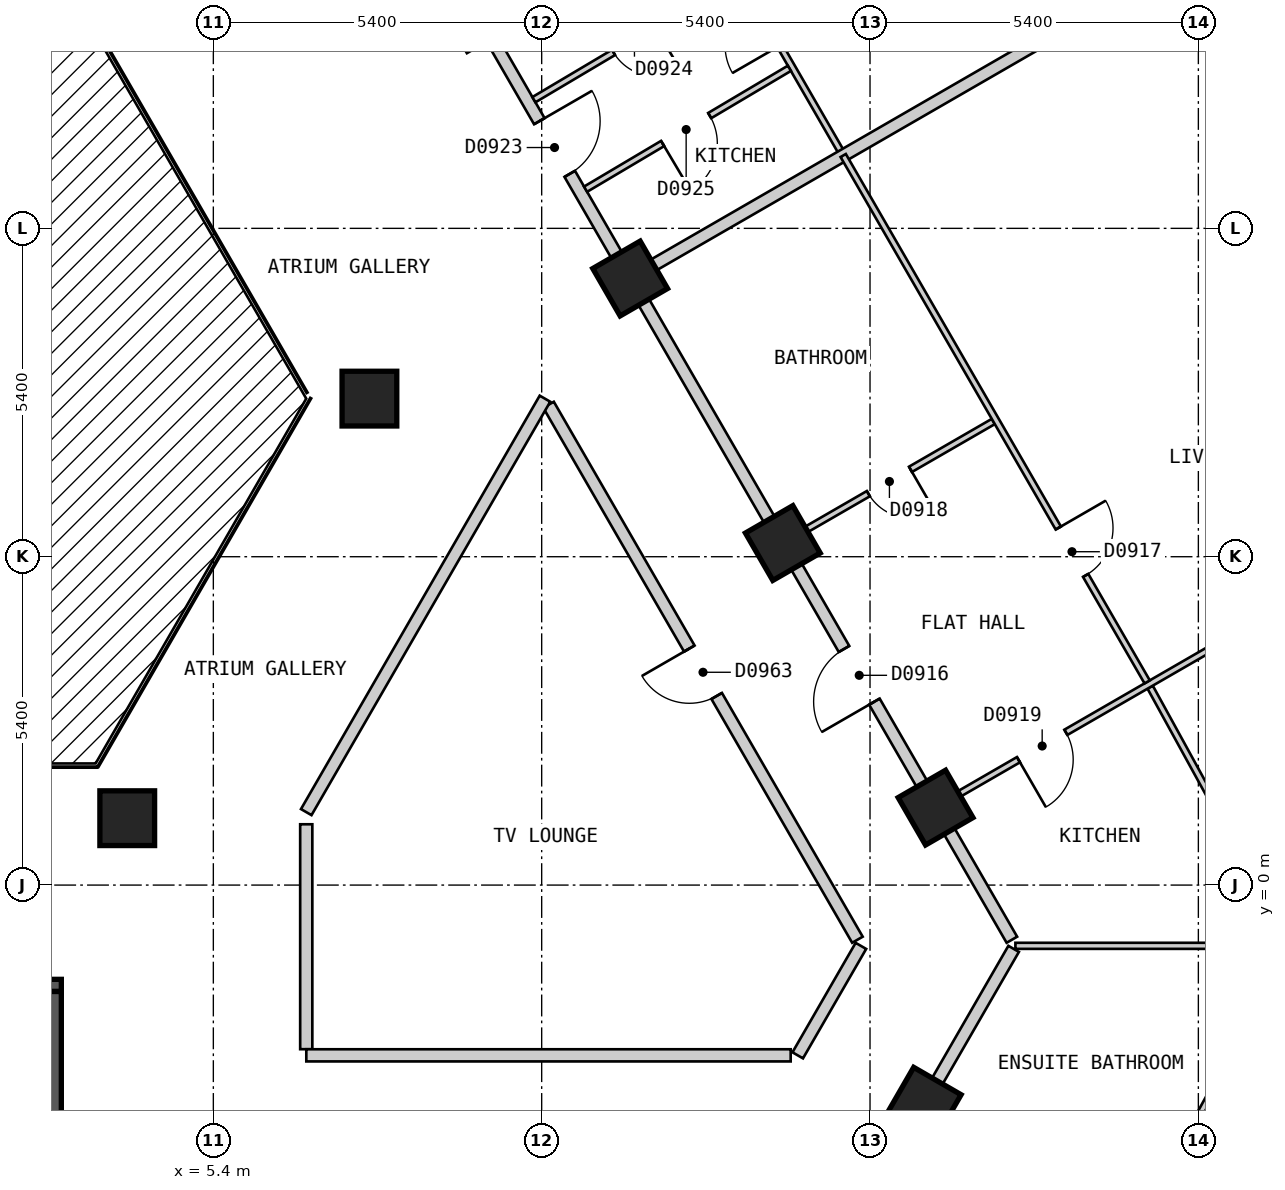
"""IFC4 building model, lengths in metres.
Left out: names, types, materials, properties, quantities, classifications, styles, units other than length and angle.
Written with IfcOpenShell. Run it as: python <this file> out.ifc"""

import sys

from ifc_helpers import new_model, si_unit, direction, frame, frame_2d, origin, origin_2d, place, context, subcontext, project, spatial, polyline, rectangle, outline, extrude, element, fill, save


model = new_model("IFC4")
c1 = context("Model", 3, precision=1e-05, world=origin(), true_north=direction((0.0, 1.0)))
c2 = subcontext(c1, "Body", "Model", "MODEL_VIEW")
j1 = project(units=[si_unit("LENGTHUNIT", "METRE"), si_unit("PLANEANGLEUNIT", "RADIAN")], contexts=[c1])
p1 = place(None, origin())
s1 = spatial("IfcSite", under=j1, at=p1, CompositionType="ELEMENT")
p2 = place(p1, origin())
s2 = spatial("IfcBuilding", under=s1, at=p2, CompositionType="ELEMENT")
p3 = place(p2, frame((0.0, 0.0, 102.0)))
s3 = spatial("IfcBuildingStorey", under=s2, at=p3, CompositionType="ELEMENT", Elevation=102.0)
for number, where, z_axis, x_axis in (
    (1, (17.083, -3.612, 0.0), (0.0, 0.0, 1.0), (0.5, 0.866, 0.0)),
    (2, (17.278, 1.274, 0.0), (0.0, 0.0, 1.0), (-0.5, 0.866, 0.0)),
    (3, (3.984, 1.1, 0.0), (0.0, 0.0, 1.0), (1.0, 0.0, 0.0)),
    (4, (14.766, 5.625, 0.0), (0.0, 0.0, 1.0), (-0.5, 0.866, 0.0)),
    (5, (12.255, 9.975, 0.0), (0.0, 0.0, 1.0), (-0.5, 0.866, 0.0)),
    (6, (7.967, 8.0, 0.0), (0.0, 0.0, 1.0), (1.0, 0.0, 0.0)),
):
    element("IfcColumn", number, at=place(p3, frame(where, z_axis=z_axis, x_axis=x_axis)), inside=s3, PredefinedType="COLUMN", context=c2, shape_type="SweptSolid", body=[
        extrude(rectangle(XDim=0.9, YDim=0.9, at=origin_2d()), origin(), (0.0, 0.0, 1.0), 3.0),
    ])
p4 = place(p3, frame((17.479, -23.425, 0.0), z_axis=(0.0, 0.0, 1.0), x_axis=(0.500035407905, 0.866004960056, 0.0)))
e7 = element("IfcWall", 7, at=p4, inside=s3, PredefinedType="SOLIDWALL", context=c2, shape_type="SweptSolid", body=[
    extrude(outline(polyline([(0.0, -0.15), (23.094, -0.15), (23.014, 0.15), (0.08, 0.15), (0.0, -0.15)])), origin(), (0.0, 0.0, 1.0), 2.7),
])
p5 = place(p4, frame((2.677, 0.0, 0.15)))
e8 = element("IfcOpeningElement", 8, at=p5, cuts=e7, PredefinedType="OPENING", context=c2, shape_type="SweptSolid", body=[
    extrude(rectangle(XDim=1.5, YDim=2.1, at=frame_2d((0.75, 1.05))), frame((0.0, 0.16, 0.0), z_axis=(0.0, -1.0, 0.0), x_axis=(1.0, 0.0, 0.0)), (0.0, 0.0, 1.0), 0.32),
])
p6 = place(p4, frame((8.091, 0.0, 0.15)))
e9 = element("IfcOpeningElement", 9, at=p6, cuts=e7, PredefinedType="OPENING", context=c2, shape_type="SweptSolid", body=[
    extrude(rectangle(XDim=1.5, YDim=2.1, at=frame_2d((0.75, 1.05))), frame((0.0, 0.16, 0.0), z_axis=(0.0, -1.0, 0.0), x_axis=(1.0, 0.0, 0.0)), (0.0, 0.0, 1.0), 0.32),
])
p7 = place(p4, frame((13.504, 0.0, 0.15)))
e10 = element("IfcOpeningElement", 10, at=p7, cuts=e7, PredefinedType="OPENING", context=c2, shape_type="SweptSolid", body=[
    extrude(rectangle(XDim=1.5, YDim=2.1, at=frame_2d((0.75, 1.05))), frame((0.0, 0.16, 0.0), z_axis=(0.0, -1.0, 0.0), x_axis=(1.0, 0.0, 0.0)), (0.0, 0.0, 1.0), 0.32),
])
p8 = place(p4, frame((18.917, 0.0, 0.15)))
e11 = element("IfcOpeningElement", 11, at=p8, cuts=e7, PredefinedType="OPENING", context=c2, shape_type="SweptSolid", body=[
    extrude(rectangle(XDim=1.5, YDim=2.1, at=frame_2d((0.75, 1.05))), frame((0.0, 0.16, 0.0), z_axis=(0.0, -1.0, 0.0), x_axis=(1.0, 0.0, 0.0)), (0.0, 0.0, 1.0), 0.32),
])
p9 = place(p3, frame((29.027, 1.425, 0.0), z_axis=(0.0, 0.0, 1.0), x_axis=(-0.500027479704, 0.866009537788, 0.0)))
e12 = element("IfcWall", 12, at=p9, inside=s3, PredefinedType="SOLIDWALL", context=c2, shape_type="SweptSolid", body=[
    extrude(outline(polyline([(0.0, -0.15), (26.559, -0.15), (26.478, 0.15), (0.08, 0.15), (0.0, -0.15)])), origin(), (0.0, 0.0, 1.0), 2.7),
])
p10 = place(p9, frame((2.483, 0.0, 0.15)))
e13 = element("IfcOpeningElement", 13, at=p10, cuts=e12, PredefinedType="OPENING", context=c2, shape_type="SweptSolid", body=[
    extrude(rectangle(XDim=1.5, YDim=2.1, at=frame_2d((0.75, 1.05))), frame((0.0, 0.16, 0.0), z_axis=(0.0, -1.0, 0.0), x_axis=(1.0, 0.0, 0.0)), (0.0, 0.0, 1.0), 0.32),
])
p11 = place(p9, frame((7.506, 0.0, 0.15)))
e14 = element("IfcOpeningElement", 14, at=p11, cuts=e12, PredefinedType="OPENING", context=c2, shape_type="SweptSolid", body=[
    extrude(rectangle(XDim=1.5, YDim=2.1, at=frame_2d((0.75, 1.05))), frame((0.0, 0.16, 0.0), z_axis=(0.0, -1.0, 0.0), x_axis=(1.0, 0.0, 0.0)), (0.0, 0.0, 1.0), 0.32),
])
p12 = place(p9, frame((12.529, 0.0, 0.15)))
e15 = element("IfcOpeningElement", 15, at=p12, cuts=e12, PredefinedType="OPENING", context=c2, shape_type="SweptSolid", body=[
    extrude(rectangle(XDim=1.5, YDim=2.1, at=frame_2d((0.75, 1.05))), frame((0.0, 0.16, 0.0), z_axis=(0.0, -1.0, 0.0), x_axis=(1.0, 0.0, 0.0)), (0.0, 0.0, 1.0), 0.32),
])
p13 = place(p9, frame((17.552, 0.0, 0.15)))
e16 = element("IfcOpeningElement", 16, at=p13, cuts=e12, PredefinedType="OPENING", context=c2, shape_type="SweptSolid", body=[
    extrude(rectangle(XDim=1.5, YDim=2.1, at=frame_2d((0.75, 1.05))), frame((0.0, 0.16, 0.0), z_axis=(0.0, -1.0, 0.0), x_axis=(1.0, 0.0, 0.0)), (0.0, 0.0, 1.0), 0.32),
])
p14 = place(p9, frame((22.575, 0.0, 0.15)))
e17 = element("IfcOpeningElement", 17, at=p14, cuts=e12, PredefinedType="OPENING", context=c2, shape_type="SweptSolid", body=[
    extrude(rectangle(XDim=1.5, YDim=2.1, at=frame_2d((0.75, 1.05))), frame((0.0, 0.16, 0.0), z_axis=(0.0, -1.0, 0.0), x_axis=(1.0, 0.0, 0.0)), (0.0, 0.0, 1.0), 0.32),
])
p15 = place(p3, frame((-2.9, -1.65, 0.0), z_axis=(0.0, 0.0, 1.0), x_axis=(1.0, 0.0, 0.0)))
e18 = element("IfcWall", 18, at=p15, inside=s3, PredefinedType="SOLIDWALL", context=c2, shape_type="SweptSolid", body=[
    extrude(rectangle(XDim=5.8, YDim=0.2, at=frame_2d((2.9, 0.0))), origin(), (0.0, 0.0, 1.0), 2.7),
])
p16 = place(p15, frame((0.3, 0.0, 0.0)))
e19 = element("IfcOpeningElement", 19, at=p16, cuts=e18, PredefinedType="OPENING", context=c2, shape_type="SweptSolid", body=[
    extrude(rectangle(XDim=1.2, YDim=2.1, at=frame_2d((0.6, 1.05))), frame((0.0, 0.11, 0.0), z_axis=(0.0, -1.0, 0.0), x_axis=(1.0, 0.0, 0.0)), (0.0, 0.0, 1.0), 0.22),
])
p17 = place(p3, frame((2.8, -4.5, 0.0), z_axis=(0.0, 0.0, 1.0), x_axis=(0.0, 1.0, 0.0)))
e20 = element("IfcWall", 20, at=p17, inside=s3, PredefinedType="SOLIDWALL", context=c2, shape_type="SweptSolid", body=[
    extrude(rectangle(XDim=2.75, YDim=0.2, at=frame_2d((1.375, 0.0))), origin(), (0.0, 0.0, 1.0), 2.7),
])
p18 = place(p3, frame((10.913, 7.899, 0.0), z_axis=(0.0, 0.0, 1.0), x_axis=(0.500028940566, -0.866008694296, 0.0)))
e21 = element("IfcWall", 21, at=p18, inside=s3, PredefinedType="PARTITIONING", context=c2, shape_type="SweptSolid", body=[
    extrude(rectangle(XDim=10.159, YDim=0.2, at=frame_2d((5.08, 0.0))), origin(), (0.0, 0.0, 1.0), 2.7),
])
p19 = place(p18, frame((4.63, 0.0, 0.0)))
e22 = element("IfcOpeningElement", 22, at=p19, cuts=e21, PredefinedType="OPENING", context=c2, shape_type="SweptSolid", body=[
    extrude(rectangle(XDim=0.9, YDim=2.1, at=frame_2d((0.45, 1.05))), frame((0.0, 0.11, 0.0), z_axis=(0.0, -1.0, 0.0), x_axis=(1.0, 0.0, 0.0)), (0.0, 0.0, 1.0), 0.22),
])
p20 = place(p3, frame((8.488, 16.5, 0.0), z_axis=(0.0, 0.0, 1.0), x_axis=(0.499986836607, -0.86603300354, 0.0)))
e23 = element("IfcWall", 23, at=p20, inside=s3, PredefinedType="PARTITIONING", context=c2, shape_type="SweptSolid", body=[
    extrude(rectangle(XDim=20.09, YDim=0.2, at=frame_2d((10.045, 0.0))), origin(), (0.0, 0.0, 1.0), 2.7),
])
p21 = place(p20, frame((14.569, 0.0, 0.0)))
e24 = element("IfcOpeningElement", 24, at=p21, cuts=e23, PredefinedType="OPENING", context=c2, shape_type="SweptSolid", body=[
    extrude(rectangle(XDim=1.0, YDim=2.1, at=frame_2d((0.5, 1.05))), frame((0.0, 0.11, 0.0), z_axis=(0.0, -1.0, 0.0), x_axis=(1.0, 0.0, 0.0)), (0.0, 0.0, 1.0), 0.22),
])
p22 = place(p20, frame((4.547, 0.0, 0.0)))
e25 = element("IfcOpeningElement", 25, at=p22, cuts=e23, PredefinedType="OPENING", context=c2, shape_type="SweptSolid", body=[
    extrude(rectangle(XDim=1.0, YDim=2.1, at=frame_2d((0.5, 1.05))), frame((0.0, 0.11, 0.0), z_axis=(0.0, -1.0, 0.0), x_axis=(1.0, 0.0, 0.0)), (0.0, 0.0, 1.0), 0.22),
])
p23 = place(p3, frame((6.928, 1.0, 0.0), z_axis=(0.0, 0.0, 1.0), x_axis=(0.0, -1.0, 0.0)))
e26 = element("IfcWall", 26, at=p23, inside=s3, PredefinedType="PARTITIONING", context=c2, shape_type="SweptSolid", body=[
    extrude(rectangle(XDim=3.699, YDim=0.2, at=frame_2d((1.85, 0.0))), origin(), (0.0, 0.0, 1.0), 2.7),
])
p24 = place(p3, frame((6.929, -2.8, 0.0), z_axis=(0.0, 0.0, 1.0), x_axis=(1.0, 0.0, 0.0)))
e27 = element("IfcWall", 27, at=p24, inside=s3, PredefinedType="PARTITIONING", context=c2, shape_type="SweptSolid", body=[
    extrude(rectangle(XDim=7.966, YDim=0.2, at=frame_2d((3.983, 0.0))), origin(), (0.0, 0.0, 1.0), 2.7),
])
p25 = place(p3, frame((6.928, 1.2, 0.0), z_axis=(0.0, 0.0, 1.0), x_axis=(0.500055327065, 0.865993458332, 0.0)))
e28 = element("IfcWall", 28, at=p25, inside=s3, PredefinedType="PARTITIONING", context=c2, shape_type="SweptSolid", body=[
    extrude(rectangle(XDim=7.851, YDim=0.2, at=frame_2d((3.926, 0.0))), origin(), (0.0, 0.0, 1.0), 2.7),
])
p26 = place(p3, frame((15.011, -2.8, 0.0), z_axis=(0.0, 0.0, 1.0), x_axis=(0.499929208183, 0.866066271601, 0.0)))
e29 = element("IfcWall", 29, at=p26, inside=s3, PredefinedType="PARTITIONING", context=c2, shape_type="SweptSolid", body=[
    extrude(rectangle(XDim=2.078, YDim=0.2, at=frame_2d((1.039, 0.0))), origin(), (0.0, 0.0, 1.0), 2.7),
])
p27 = place(p3, frame((15.771, -5.884, 0.0), z_axis=(0.0, 0.0, 1.0), x_axis=(0.499939494019, 0.866060334111, 0.0)))
e30 = element("IfcWall", 30, at=p27, inside=s3, PredefinedType="PARTITIONING", context=c2, shape_type="SweptSolid", body=[
    extrude(rectangle(XDim=5.583, YDim=0.2, at=frame_2d((2.792, 0.0))), origin(), (0.0, 0.0, 1.0), 2.7),
])
p28 = place(p3, frame((13.263, 16.322, 0.0), z_axis=(0.0, 0.0, 1.0), x_axis=(0.499946798379, -0.866056117576, 0.0)))
e31 = element("IfcWall", 31, at=p28, inside=s3, PredefinedType="PARTITIONING", context=c2, shape_type="SweptSolid", body=[
    extrude(rectangle(XDim=4.993, YDim=0.1, at=frame_2d((2.496, 0.0))), origin(), (0.0, 0.0, 1.0), 2.7),
])
p29 = place(p28, frame((2.007, 0.0, 0.0)))
e32 = element("IfcOpeningElement", 32, at=p29, cuts=e31, PredefinedType="OPENING", context=c2, shape_type="SweptSolid", body=[
    extrude(rectangle(XDim=0.9, YDim=2.1, at=frame_2d((0.45, 1.05))), frame((0.0, 0.06, 0.0), z_axis=(0.0, -1.0, 0.0), x_axis=(1.0, 0.0, 0.0)), (0.0, 0.0, 1.0), 0.12),
])
p30 = place(p3, frame((20.807, 3.255, 0.0), z_axis=(0.0, 0.0, 1.0), x_axis=(0.481604009855, -0.876388942018, 0.0)))
e33 = element("IfcWall", 33, at=p30, inside=s3, PredefinedType="PARTITIONING", context=c2, shape_type="SweptSolid", body=[
    extrude(rectangle(XDim=4.795, YDim=0.1, at=frame_2d((2.397, 0.0))), origin(), (0.0, 0.0, 1.0), 2.7),
])
p31 = place(p3, frame((18.591, -0.999, 0.0), z_axis=(0.0, 0.0, 1.0), x_axis=(1.0, 0.0, 0.0)))
e34 = element("IfcWall", 34, at=p31, inside=s3, PredefinedType="PARTITIONING", context=c2, shape_type="SweptSolid", body=[
    extrude(rectangle(XDim=10.266, YDim=0.1, at=frame_2d((5.133, 0.0))), origin(), (0.0, 0.0, 1.0), 2.7),
])
p32 = place(p31, frame((7.079, 0.0, 0.0)))
e35 = element("IfcOpeningElement", 35, at=p32, cuts=e34, PredefinedType="OPENING", context=c2, shape_type="SweptSolid", body=[
    extrude(rectangle(XDim=0.9, YDim=2.1, at=frame_2d((0.45, 1.05))), frame((0.0, 0.06, 0.0), z_axis=(0.0, -1.0, 0.0), x_axis=(1.0, 0.0, 0.0)), (0.0, 0.0, 1.0), 0.12),
])
p33 = place(p3, frame((20.812, -5.248, 0.0), z_axis=(0.0, 0.0, 1.0), x_axis=(0.481196609449, 0.876612698434, 0.0)))
e36 = element("IfcWall", 36, at=p33, inside=s3, PredefinedType="PARTITIONING", context=c2, shape_type="SweptSolid", body=[
    extrude(rectangle(XDim=4.79, YDim=0.1, at=frame_2d((2.395, 0.0))), origin(), (0.0, 0.0, 1.0), 2.7),
])
p34 = place(p33, frame((2.023, 0.0, 0.0)))
e37 = element("IfcOpeningElement", 37, at=p34, cuts=e36, PredefinedType="OPENING", context=c2, shape_type="SweptSolid", body=[
    extrude(rectangle(XDim=0.8, YDim=2.1, at=frame_2d((0.4, 1.05))), frame((0.0, 0.06, 0.0), z_axis=(0.0, -1.0, 0.0), x_axis=(1.0, 0.0, 0.0)), (0.0, 0.0, 1.0), 0.12),
])
p35 = place(p3, frame((17.365, 1.325, 0.0), z_axis=(0.0, 0.0, 1.0), x_axis=(0.866016855193, 0.500014806302, 0.0)))
e38 = element("IfcWall", 38, at=p35, inside=s3, PredefinedType="PARTITIONING", context=c2, shape_type="SweptSolid", body=[
    extrude(rectangle(XDim=10.0, YDim=0.1, at=frame_2d((5.0, 0.0))), origin(), (0.0, 0.0, 1.0), 2.7),
])
p36 = place(p35, frame((1.474, 0.0, 0.0)))
e39 = element("IfcOpeningElement", 39, at=p36, cuts=e38, PredefinedType="OPENING", context=c2, shape_type="SweptSolid", body=[
    extrude(rectangle(XDim=0.9, YDim=2.1, at=frame_2d((0.45, 1.05))), frame((0.0, 0.06, 0.0), z_axis=(0.0, -1.0, 0.0), x_axis=(1.0, 0.0, 0.0)), (0.0, 0.0, 1.0), 0.12),
])
p37 = place(p35, frame((6.524, 0.0, 0.0)))
e40 = element("IfcOpeningElement", 40, at=p37, cuts=e38, PredefinedType="OPENING", context=c2, shape_type="SweptSolid", body=[
    extrude(rectangle(XDim=0.9, YDim=2.1, at=frame_2d((0.45, 1.05))), frame((0.0, 0.06, 0.0), z_axis=(0.0, -1.0, 0.0), x_axis=(1.0, 0.0, 0.0)), (0.0, 0.0, 1.0), 0.12),
])
p38 = place(p3, frame((14.853, 5.675, 0.0), z_axis=(0.0, 0.0, 1.0), x_axis=(0.865979019114, 0.500080332001, 0.0)))
e41 = element("IfcWall", 41, at=p38, inside=s3, PredefinedType="PARTITIONING", context=c2, shape_type="SweptSolid", body=[
    extrude(rectangle(XDim=3.897, YDim=0.1, at=frame_2d((1.949, 0.0))), origin(), (0.0, 0.0, 1.0), 2.7),
])
p39 = place(p38, frame((1.524, 0.0, 0.0)))
e42 = element("IfcOpeningElement", 42, at=p39, cuts=e41, PredefinedType="OPENING", context=c2, shape_type="SweptSolid", body=[
    extrude(rectangle(XDim=0.8, YDim=2.1, at=frame_2d((0.4, 1.05))), frame((0.0, 0.06, 0.0), z_axis=(0.0, -1.0, 0.0), x_axis=(1.0, 0.0, 0.0)), (0.0, 0.0, 1.0), 0.12),
])
p40 = place(p3, frame((11.522, 11.444, 0.0), z_axis=(0.0, 0.0, 1.0), x_axis=(0.860134781641, 0.510066816615, 0.0)))
e43 = element("IfcWall", 43, at=p40, inside=s3, PredefinedType="PARTITIONING", context=c2, shape_type="SweptSolid", body=[
    extrude(rectangle(XDim=3.897, YDim=0.1, at=frame_2d((1.949, 0.0))), origin(), (0.0, 0.0, 1.0), 2.7),
])
p41 = place(p40, frame((1.473, 0.0, 0.0)))
e44 = element("IfcOpeningElement", 44, at=p41, cuts=e43, PredefinedType="OPENING", context=c2, shape_type="SweptSolid", body=[
    extrude(rectangle(XDim=0.9, YDim=2.1, at=frame_2d((0.45, 1.05))), frame((0.0, 0.06, 0.0), z_axis=(0.0, -1.0, 0.0), x_axis=(1.0, 0.0, 0.0)), (0.0, 0.0, 1.0), 0.12),
])
p42 = place(p3, frame((10.672, 12.916, 0.0), z_axis=(0.0, 0.0, 1.0), x_axis=(0.859981037235, 0.510325989537, 0.0)))
e45 = element("IfcWall", 45, at=p42, inside=s3, PredefinedType="PARTITIONING", context=c2, shape_type="SweptSolid", body=[
    extrude(rectangle(XDim=3.897, YDim=0.1, at=frame_2d((1.949, 0.0))), origin(), (0.0, 0.0, 1.0), 2.7),
])
p43 = place(p42, frame((1.523, 0.0, 0.0)))
e46 = element("IfcOpeningElement", 46, at=p43, cuts=e45, PredefinedType="OPENING", context=c2, shape_type="SweptSolid", body=[
    extrude(rectangle(XDim=0.8, YDim=2.1, at=frame_2d((0.4, 1.05))), frame((0.0, 0.06, 0.0), z_axis=(0.0, -1.0, 0.0), x_axis=(1.0, 0.0, 0.0)), (0.0, 0.0, 1.0), 0.12),
])
p44 = place(p3, frame((17.169, -3.662, 0.0), z_axis=(0.0, 0.0, 1.0), x_axis=(0.866047370643, -0.499961950354, 0.0)))
e47 = element("IfcWall", 47, at=p44, inside=s3, PredefinedType="PARTITIONING", context=c2, shape_type="SweptSolid", body=[
    extrude(rectangle(XDim=10.001, YDim=0.2, at=frame_2d((5.0, 0.0))), origin(), (0.0, 0.0, 1.0), 2.7),
])
p45 = place(p3, frame((12.342, 10.025, 0.0), z_axis=(0.0, 0.0, 1.0), x_axis=(0.865992435864, 0.500057097767, 0.0)))
e48 = element("IfcWall", 48, at=p45, inside=s3, PredefinedType="PARTITIONING", context=c2, shape_type="SweptSolid", body=[
    extrude(rectangle(XDim=9.999, YDim=0.2, at=frame_2d((5.0, 0.0))), origin(), (0.0, 0.0, 1.0), 2.7),
])
p46 = place(p3, frame((15.759, 11.998, 0.0), z_axis=(0.0, 0.0, 1.0), x_axis=(0.500068444113, -0.865985883951, 0.0)))
e49 = element("IfcWall", 49, at=p46, inside=s3, PredefinedType="PARTITIONING", context=c2, shape_type="SweptSolid", body=[
    extrude(rectangle(XDim=9.997, YDim=0.1, at=frame_2d((4.998, 0.0))), origin(), (0.0, 0.0, 1.0), 2.7),
])
p47 = place(p46, frame((7.074, 0.0, 0.0)))
e50 = element("IfcOpeningElement", 50, at=p47, cuts=e49, PredefinedType="OPENING", context=c2, shape_type="SweptSolid", body=[
    extrude(rectangle(XDim=0.9, YDim=2.1, at=frame_2d((0.45, 1.05))), frame((0.0, 0.06, 0.0), z_axis=(0.0, -1.0, 0.0), x_axis=(1.0, 0.0, 0.0)), (0.0, 0.0, 1.0), 0.12),
])
p48 = place(p21, origin())
e51 = element("IfcDoor", 51, at=p48, inside=s3, OperationType="SINGLE_SWING_RIGHT", PredefinedType="DOOR", context=c2, shape_type="SweptSolid", body=[
    extrude(rectangle(XDim=1.0, YDim=2.1, at=frame_2d((0.5, 1.05))), frame((0.0, 0.025, 0.0), z_axis=(0.0, -1.0, 0.0), x_axis=(1.0, 0.0, 0.0)), (0.0, 0.0, 1.0), 0.05),
])
fill(e24, e51)
p49 = place(p47, origin())
e52 = element("IfcDoor", 52, at=p49, inside=s3, OperationType="SINGLE_SWING_LEFT", PredefinedType="DOOR", context=c2, shape_type="SweptSolid", body=[
    extrude(rectangle(XDim=0.9, YDim=2.1, at=frame_2d((0.45, 1.05))), frame((0.0, 0.025, 0.0), z_axis=(0.0, -1.0, 0.0), x_axis=(1.0, 0.0, 0.0)), (0.0, 0.0, 1.0), 0.05),
])
fill(e50, e52)
p50 = place(p39, origin())
e53 = element("IfcDoor", 53, at=p50, inside=s3, OperationType="SINGLE_SWING_RIGHT", PredefinedType="DOOR", context=c2, shape_type="SweptSolid", body=[
    extrude(rectangle(XDim=0.8, YDim=2.1, at=frame_2d((0.4, 1.05))), frame((0.0, 0.025, 0.0), z_axis=(0.0, -1.0, 0.0), x_axis=(1.0, 0.0, 0.0)), (0.0, 0.0, 1.0), 0.05),
])
fill(e42, e53)
p51 = place(p36, origin())
e54 = element("IfcDoor", 54, at=p51, inside=s3, OperationType="SINGLE_SWING_LEFT", PredefinedType="DOOR", context=c2, shape_type="SweptSolid", body=[
    extrude(rectangle(XDim=0.9, YDim=2.1, at=frame_2d((0.45, 1.05))), frame((0.0, 0.025, 0.0), z_axis=(0.0, -1.0, 0.0), x_axis=(1.0, 0.0, 0.0)), (0.0, 0.0, 1.0), 0.05),
])
fill(e39, e54)
p52 = place(p22, origin())
e55 = element("IfcDoor", 55, at=p52, inside=s3, OperationType="SINGLE_SWING_LEFT", PredefinedType="DOOR", context=c2, shape_type="SweptSolid", body=[
    extrude(rectangle(XDim=1.0, YDim=2.1, at=frame_2d((0.5, 1.05))), frame((0.0, 0.025, 0.0), z_axis=(0.0, -1.0, 0.0), x_axis=(1.0, 0.0, 0.0)), (0.0, 0.0, 1.0), 0.05),
])
fill(e25, e55)
p53 = place(p43, origin())
e56 = element("IfcDoor", 56, at=p53, inside=s3, OperationType="SINGLE_SWING_RIGHT", PredefinedType="DOOR", context=c2, shape_type="SweptSolid", body=[
    extrude(rectangle(XDim=0.8, YDim=2.1, at=frame_2d((0.4, 1.05))), frame((0.0, 0.025, 0.0), z_axis=(0.0, -1.0, 0.0), x_axis=(1.0, 0.0, 0.0)), (0.0, 0.0, 1.0), 0.05),
])
fill(e46, e56)
p54 = place(p41, origin())
e57 = element("IfcDoor", 57, at=p54, inside=s3, OperationType="SINGLE_SWING_LEFT", PredefinedType="DOOR", context=c2, shape_type="SweptSolid", body=[
    extrude(rectangle(XDim=0.9, YDim=2.1, at=frame_2d((0.45, 1.05))), frame((0.0, 0.025, 0.0), z_axis=(0.0, -1.0, 0.0), x_axis=(1.0, 0.0, 0.0)), (0.0, 0.0, 1.0), 0.05),
])
fill(e44, e57)
p55 = place(p19, origin())
e58 = element("IfcDoor", 58, at=p55, inside=s3, OperationType="SINGLE_SWING_LEFT", PredefinedType="DOOR", context=c2, shape_type="SweptSolid", body=[
    extrude(rectangle(XDim=0.9, YDim=2.1, at=frame_2d((0.45, 1.05))), frame((0.0, 0.025, 0.0), z_axis=(0.0, -1.0, 0.0), x_axis=(1.0, 0.0, 0.0)), (0.0, 0.0, 1.0), 0.05),
])
fill(e22, e58)
save(model, sys.argv[1])
